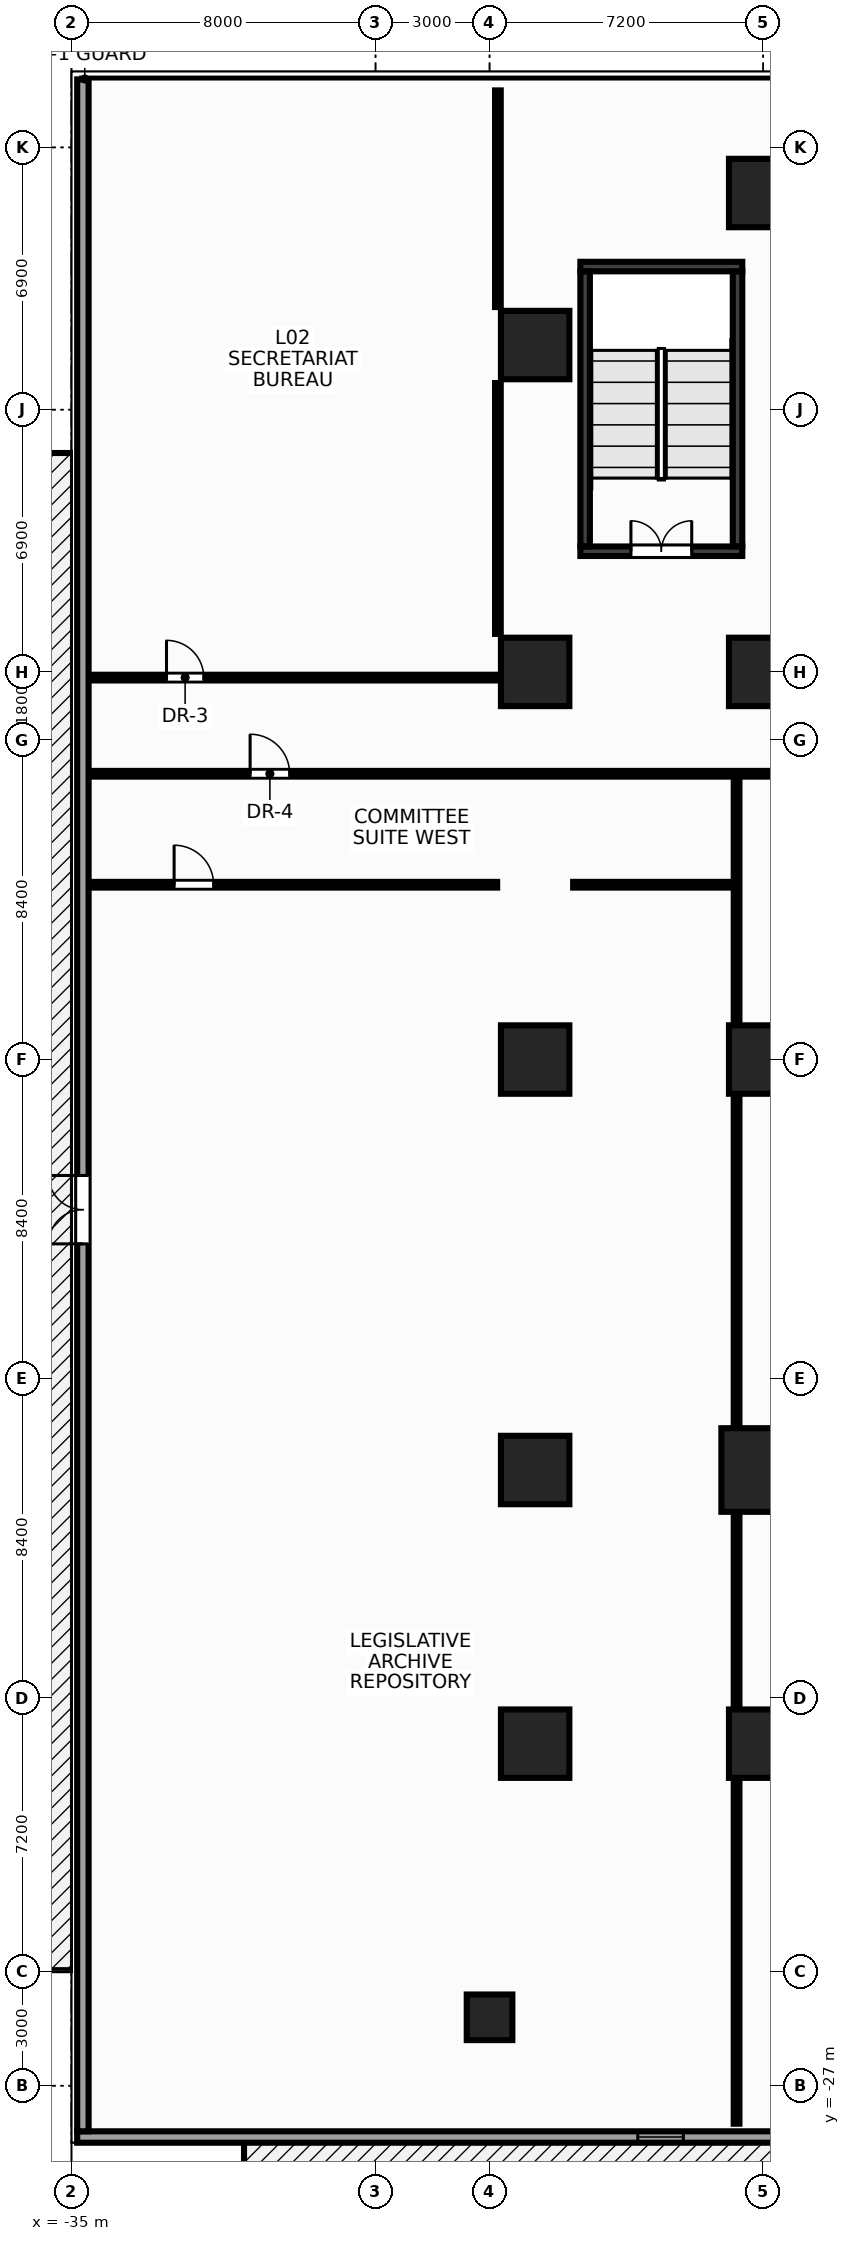
"""IFC4 building model, lengths in metres.
Left out: names, types, materials, properties, quantities, classifications, styles, units other than length and angle.
Written with IfcOpenShell. Run it as: python <this file> out.ifc"""

import sys

from ifc_helpers import new_model, si_unit, direction, frame, frame_2d, origin, origin_2d, place, context, subcontext, project, spatial, rectangle, hollow_rectangle, extrude, source, transform, mapped, element, fill, save


model = new_model("IFC4")
c1 = context("Model", 3, precision=1e-05, world=origin(), true_north=direction((0.0, 1.0)))
c2 = subcontext(c1, "Body", "Model", "MODEL_VIEW")
j1 = project(units=[si_unit("LENGTHUNIT", "METRE"), si_unit("PLANEANGLEUNIT", "RADIAN")], contexts=[c1])
p1 = place(None, origin())
s1 = spatial("IfcSite", under=j1, at=p1, CompositionType="ELEMENT")
p2 = place(p1, origin())
s2 = spatial("IfcBuilding", under=s1, at=p2, CompositionType="ELEMENT")
p3 = place(p2, frame((0.0, 0.0, 9.65)))
s3 = spatial("IfcBuildingStorey", under=s2, at=p3, CompositionType="ELEMENT", Elevation=9.65)
m1 = source(origin(), c2, "Body", "SweptSolid", [
    extrude(rectangle(XDim=4.26, YDim=0.25, at=frame_2d((2.13, 0.0))), origin(), (0.0, 0.0, 1.0), 4.65),
])
p4 = place(p3, frame((-21.61, 20.865, 0.0), z_axis=(0.0, 0.0, 1.0), x_axis=(1.0, 0.0, 0.0)))
e1 = element("IfcWall", 1, at=p4, inside=s3, PredefinedType="SHEAR", context=c2, shape_type="MappedRepresentation", body=[
    mapped(m1, transform((0.0, 0.0, 0.0), x_axis=(1.0, 0.0, 0.0), y_axis=(0.0, 1.0, 0.0), z_axis=(0.0, 0.0, 1.0), scale=1.0)),
])
p5 = place(p3, frame((-21.61, 13.375, 0.0), z_axis=(0.0, 0.0, 1.0), x_axis=(1.0, 0.0, 0.0)))
e2 = element("IfcWall", 2, at=p5, inside=s3, PredefinedType="SHEAR", context=c2, shape_type="MappedRepresentation", body=[
    mapped(m1, transform((0.0, 0.0, 0.0), x_axis=(1.0, 0.0, 0.0), y_axis=(0.0, 1.0, 0.0), z_axis=(0.0, 0.0, 1.0), scale=1.0)),
])
p6 = place(p5, frame((1.33, 0.0, 0.0)))
e3 = element("IfcOpeningElement", 3, at=p6, cuts=e2, PredefinedType="OPENING", context=c2, shape_type="SweptSolid", body=[
    extrude(rectangle(XDim=1.6, YDim=2.15, at=frame_2d((0.8, 1.075))), frame((0.0, 0.137, 0.0), z_axis=(0.0, -1.0, 0.0), x_axis=(1.0, 0.0, 0.0)), (0.0, 0.0, 1.0), 0.274),
])
m2 = source(origin(), c2, "Body", "SweptSolid", [
    extrude(rectangle(XDim=7.23, YDim=0.25, at=frame_2d((3.615, 0.0))), origin(), (0.0, 0.0, 1.0), 4.65),
])
for number, where, z_axis, x_axis in (
    (4, (-21.485, 13.505, 0.0), (0.0, 0.0, 1.0), (0.0, 1.0, 0.0)),
    (5, (-17.475, 13.505, 0.0), (0.0, 0.0, 1.0), (0.0, 1.0, 0.0)),
):
    element("IfcWall", number, at=place(p3, frame(where, z_axis=z_axis, x_axis=x_axis)), inside=s3, PredefinedType="SHEAR", context=c2, shape_type="MappedRepresentation", body=[
        mapped(m2, transform((0.0, 0.0, 0.0), x_axis=(1.0, 0.0, 0.0), y_axis=(0.0, 1.0, 0.0), z_axis=(0.0, 0.0, 1.0), scale=1.0)),
    ])
m3 = source(origin(), c2, "Body", "SweptSolid", [
    extrude(hollow_rectangle(XDim=1.2, YDim=1.2, WallThickness=0.055, at=origin_2d()), origin(), (0.0, 0.0, 1.0), 4.62),
])
p7 = place(p3, frame((-24.0, -25.2, 0.0), z_axis=(0.0, 0.0, 1.0), x_axis=(1.0, 0.0, 0.0)))
e6 = element("IfcColumn", 6, at=p7, inside=s3, PredefinedType="COLUMN", context=c2, shape_type="MappedRepresentation", body=[
    mapped(m3, transform((0.0, 0.0, 0.0), x_axis=(1.0, 0.0, 0.0), y_axis=(0.0, 1.0, 0.0), z_axis=(0.0, 0.0, 1.0), scale=1.0)),
])
m4 = source(origin(), c2, "Body", "SweptSolid", [
    extrude(rectangle(XDim=1.8, YDim=1.8, at=origin_2d()), origin(), (0.0, 0.0, 1.0), 4.65),
])
p8 = place(p3, frame((-16.8, -18.0, 0.0), z_axis=(0.0, 0.0, 1.0), x_axis=(1.0, 0.0, 0.0)))
e7 = element("IfcColumn", 7, at=p8, inside=s3, PredefinedType="COLUMN", context=c2, shape_type="MappedRepresentation", body=[
    mapped(m4, transform((0.0, 0.0, 0.0), x_axis=(1.0, 0.0, 0.0), y_axis=(0.0, 1.0, 0.0), z_axis=(0.0, 0.0, 1.0), scale=1.0)),
])
m5 = source(origin(), c2, "Body", "SweptSolid", [
    extrude(rectangle(XDim=2.2, YDim=2.2, at=origin_2d()), origin(), (0.0, 0.0, 1.0), 4.65),
])
p9 = place(p3, frame((-16.8, -10.8, 0.0), z_axis=(0.0, 0.0, 1.0), x_axis=(1.0, 0.0, 0.0)))
e8 = element("IfcColumn", 8, at=p9, inside=s3, PredefinedType="COLUMN", context=c2, shape_type="MappedRepresentation", body=[
    mapped(m5, transform((0.0, 0.0, 0.0), x_axis=(1.0, 0.0, 0.0), y_axis=(0.0, 1.0, 0.0), z_axis=(0.0, 0.0, 1.0), scale=1.0)),
])
for number, where, z_axis, x_axis in (
    (9, (-16.8, 0.0, 0.0), (0.0, 0.0, 1.0), (1.0, 0.0, 0.0)),
    (10, (-16.8, 10.2, 0.0), (0.0, 0.0, 1.0), (1.0, 0.0, 0.0)),
    (11, (-16.8, 22.8, 0.0), (0.0, 0.0, 1.0), (1.0, 0.0, 0.0)),
    (12, (-22.8, -18.0, 0.0), (0.0, 0.0, 1.0), (1.0, 0.0, 0.0)),
    (13, (-22.8, -10.8, 0.0), (0.0, 0.0, 1.0), (1.0, 0.0, 0.0)),
    (14, (-22.8, 0.0, 0.0), (0.0, 0.0, 1.0), (1.0, 0.0, 0.0)),
    (15, (-22.8, 10.2, 0.0), (0.0, 0.0, 1.0), (1.0, 0.0, 0.0)),
    (16, (-22.8, 18.8, 0.0), (0.0, 0.0, 1.0), (1.0, 0.0, 0.0)),
):
    element("IfcColumn", number, at=place(p3, frame(where, z_axis=z_axis, x_axis=x_axis)), inside=s3, PredefinedType="COLUMN", context=c2, shape_type="MappedRepresentation", body=[
        mapped(m4, transform((0.0, 0.0, 0.0), x_axis=(1.0, 0.0, 0.0), y_axis=(0.0, 1.0, 0.0), z_axis=(0.0, 0.0, 1.0), scale=1.0)),
    ])
m6 = source(origin(), c2, "Body", "SweptSolid", [
    extrude(rectangle(XDim=69.7, YDim=0.3, at=frame_2d((34.85, 0.0))), origin(), (0.0, 0.0, 1.0), 3.87),
])
p10 = place(p3, frame((34.85, -28.35, 0.0), z_axis=(0.0, 0.0, 1.0), x_axis=(-1.0, 0.0, 0.0)))
e17 = element("IfcWall", 17, at=p10, inside=s3, PredefinedType="STANDARD", context=c2, shape_type="MappedRepresentation", body=[
    mapped(m6, transform((0.0, 0.0, 0.0), x_axis=(1.0, 0.0, 0.0), y_axis=(0.0, 1.0, 0.0), z_axis=(0.0, 0.0, 1.0), scale=1.0)),
])
p11 = place(p10, frame((14.75, 0.0, 0.9)))
e18 = element("IfcOpeningElement", 18, at=p11, cuts=e17, PredefinedType="OPENING", context=c2, shape_type="SweptSolid", body=[
    extrude(rectangle(XDim=1.2, YDim=2.0, at=frame_2d((0.6, 1.0))), frame((0.0, 0.162, 0.0), z_axis=(0.0, -1.0, 0.0), x_axis=(1.0, 0.0, 0.0)), (0.0, 0.0, 1.0), 0.324),
])
p12 = place(p10, frame((21.25, 0.0, 0.9)))
e19 = element("IfcOpeningElement", 19, at=p12, cuts=e17, PredefinedType="OPENING", context=c2, shape_type="SweptSolid", body=[
    extrude(rectangle(XDim=1.2, YDim=2.0, at=frame_2d((0.6, 1.0))), frame((0.0, 0.162, 0.0), z_axis=(0.0, -1.0, 0.0), x_axis=(1.0, 0.0, 0.0)), (0.0, 0.0, 1.0), 0.324),
])
p13 = place(p10, frame((47.25, 0.0, 0.9)))
e20 = element("IfcOpeningElement", 20, at=p13, cuts=e17, PredefinedType="OPENING", context=c2, shape_type="SweptSolid", body=[
    extrude(rectangle(XDim=1.2, YDim=2.0, at=frame_2d((0.6, 1.0))), frame((0.0, 0.162, 0.0), z_axis=(0.0, -1.0, 0.0), x_axis=(1.0, 0.0, 0.0)), (0.0, 0.0, 1.0), 0.324),
])
p14 = place(p10, frame((53.75, 0.0, 0.9)))
e21 = element("IfcOpeningElement", 21, at=p14, cuts=e17, PredefinedType="OPENING", context=c2, shape_type="SweptSolid", body=[
    extrude(rectangle(XDim=1.2, YDim=2.0, at=frame_2d((0.6, 1.0))), frame((0.0, 0.162, 0.0), z_axis=(0.0, -1.0, 0.0), x_axis=(1.0, 0.0, 0.0)), (0.0, 0.0, 1.0), 0.324),
])
p15 = place(p10, frame((30.35, 0.0, 0.0)))
e22 = element("IfcOpeningElement", 22, at=p15, cuts=e17, PredefinedType="OPENING", context=c2, shape_type="SweptSolid", body=[
    extrude(rectangle(XDim=1.8, YDim=2.2, at=frame_2d((0.9, 1.1))), frame((0.0, 0.162, 0.0), z_axis=(0.0, -1.0, 0.0), x_axis=(1.0, 0.0, 0.0)), (0.0, 0.0, 1.0), 0.324),
])
p16 = place(p10, frame((38.35, 0.0, 0.0)))
e23 = element("IfcOpeningElement", 23, at=p16, cuts=e17, PredefinedType="OPENING", context=c2, shape_type="SweptSolid", body=[
    extrude(rectangle(XDim=1.8, YDim=2.2, at=frame_2d((0.9, 1.1))), frame((0.0, 0.162, 0.0), z_axis=(0.0, -1.0, 0.0), x_axis=(1.0, 0.0, 0.0)), (0.0, 0.0, 1.0), 0.324),
])
m7 = source(origin(), c2, "Body", "SweptSolid", [
    extrude(rectangle(XDim=53.99, YDim=0.3, at=frame_2d((26.995, 0.0))), origin(), (0.0, 0.0, 1.0), 3.87),
])
p17 = place(p3, frame((-34.7, -28.2, 0.0), z_axis=(0.0, 0.0, 1.0), x_axis=(0.0, 1.0, 0.0)))
e24 = element("IfcWall", 24, at=p17, inside=s3, PredefinedType="STANDARD", context=c2, shape_type="MappedRepresentation", body=[
    mapped(m7, transform((0.0, 0.0, 0.0), x_axis=(1.0, 0.0, 0.0), y_axis=(0.0, 1.0, 0.0), z_axis=(0.0, 0.0, 1.0), scale=1.0)),
])
p18 = place(p17, frame((23.35, 0.0, 0.0)))
e25 = element("IfcOpeningElement", 25, at=p18, cuts=e24, PredefinedType="OPENING", context=c2, shape_type="SweptSolid", body=[
    extrude(rectangle(XDim=1.8, YDim=2.2, at=frame_2d((0.9, 1.1))), frame((0.0, 0.162, 0.0), z_axis=(0.0, -1.0, 0.0), x_axis=(1.0, 0.0, 0.0)), (0.0, 0.0, 1.0), 0.324),
])
m8 = source(origin(), c2, "Body", "SweptSolid", [
    extrude(rectangle(XDim=69.0, YDim=0.15, at=frame_2d((34.5, 0.0))), origin(), (0.0, 0.0, 1.0), 3.755),
])
p19 = place(p3, frame((-34.5, 7.52, 0.0), z_axis=(0.0, 0.0, 1.0), x_axis=(1.0, 0.0, 0.0)))
e26 = element("IfcWall", 26, at=p19, inside=s3, PredefinedType="PARTITIONING", context=c2, shape_type="MappedRepresentation", body=[
    mapped(m8, transform((0.0, 0.0, 0.0), x_axis=(1.0, 0.0, 0.0), y_axis=(0.0, 1.0, 0.0), z_axis=(0.0, 0.0, 1.0), scale=1.0)),
])
p20 = place(p19, frame((4.2, 0.0, 0.0)))
e27 = element("IfcOpeningElement", 27, at=p20, cuts=e26, PredefinedType="OPENING", context=c2, shape_type="SweptSolid", body=[
    extrude(rectangle(XDim=1.04, YDim=2.2, at=frame_2d((0.52, 1.1))), frame((0.0, 0.087, 0.0), z_axis=(0.0, -1.0, 0.0), x_axis=(1.0, 0.0, 0.0)), (0.0, 0.0, 1.0), 0.174),
])
p21 = place(p19, frame((33.7, 0.0, 0.0)))
e28 = element("IfcOpeningElement", 28, at=p21, cuts=e26, PredefinedType="OPENING", context=c2, shape_type="SweptSolid", body=[
    extrude(rectangle(XDim=1.65, YDim=2.35, at=frame_2d((0.825, 1.175))), frame((0.0, 0.087, 0.0), z_axis=(0.0, -1.0, 0.0), x_axis=(1.0, 0.0, 0.0)), (0.0, 0.0, 1.0), 0.174),
])
p22 = place(p19, frame((63.7, 0.0, 0.0)))
e29 = element("IfcOpeningElement", 29, at=p22, cuts=e26, PredefinedType="OPENING", context=c2, shape_type="SweptSolid", body=[
    extrude(rectangle(XDim=1.04, YDim=2.2, at=frame_2d((0.52, 1.1))), frame((0.0, 0.087, 0.0), z_axis=(0.0, -1.0, 0.0), x_axis=(1.0, 0.0, 0.0)), (0.0, 0.0, 1.0), 0.174),
])
m9 = source(origin(), c2, "Body", "SweptSolid", [
    extrude(rectangle(XDim=10.7, YDim=0.15, at=frame_2d((5.35, 0.0))), origin(), (0.0, 0.0, 1.0), 4.37),
])
p23 = place(p3, frame((-34.5, 10.05, 0.0), z_axis=(0.0, 0.0, 1.0), x_axis=(1.0, 0.0, 0.0)))
e30 = element("IfcWall", 30, at=p23, inside=s3, PredefinedType="PARTITIONING", context=c2, shape_type="MappedRepresentation", body=[
    mapped(m9, transform((0.0, 0.0, 0.0), x_axis=(1.0, 0.0, 0.0), y_axis=(0.0, 1.0, 0.0), z_axis=(0.0, 0.0, 1.0), scale=1.0)),
])
p24 = place(p23, frame((2.0, 0.0, 0.0)))
e31 = element("IfcOpeningElement", 31, at=p24, cuts=e30, PredefinedType="OPENING", context=c2, shape_type="SweptSolid", body=[
    extrude(rectangle(XDim=0.98, YDim=2.15, at=frame_2d((0.49, 1.075))), frame((0.0, 0.087, 0.0), z_axis=(0.0, -1.0, 0.0), x_axis=(1.0, 0.0, 0.0)), (0.0, 0.0, 1.0), 0.174),
])
m10 = source(origin(), c2, "Body", "SweptSolid", [
    extrude(rectangle(XDim=6.6, YDim=0.15, at=frame_2d((3.3, 0.0))), origin(), (0.0, 0.0, 1.0), 4.37),
])
p25 = place(p3, frame((-23.78, 11.2, 0.0), z_axis=(0.0, 0.0, 1.0), x_axis=(0.0, 1.0, 0.0)))
e32 = element("IfcWall", 32, at=p25, inside=s3, PredefinedType="PARTITIONING", context=c2, shape_type="MappedRepresentation", body=[
    mapped(m10, transform((0.0, 0.0, 0.0), x_axis=(1.0, 0.0, 0.0), y_axis=(0.0, 1.0, 0.0), z_axis=(0.0, 0.0, 1.0), scale=1.0)),
])
m11 = source(origin(), c2, "Body", "SweptSolid", [
    extrude(rectangle(XDim=5.7, YDim=0.15, at=frame_2d((2.85, 0.0))), origin(), (0.0, 0.0, 1.0), 4.37),
])
p26 = place(p3, frame((-23.78, 19.8, 0.0), z_axis=(0.0, 0.0, 1.0), x_axis=(0.0, 1.0, 0.0)))
e33 = element("IfcWall", 33, at=p26, inside=s3, PredefinedType="PARTITIONING", context=c2, shape_type="MappedRepresentation", body=[
    mapped(m11, transform((0.0, 0.0, 0.0), x_axis=(1.0, 0.0, 0.0), y_axis=(0.0, 1.0, 0.0), z_axis=(0.0, 0.0, 1.0), scale=1.0)),
])
m12 = source(origin(), c2, "Body", "SweptSolid", [
    extrude(rectangle(XDim=35.38, YDim=0.15, at=frame_2d((17.69, 0.0))), origin(), (0.0, 0.0, 1.0), 3.655),
])
p27 = place(p3, frame((-17.5, -28.0, 0.0), z_axis=(0.0, 0.0, 1.0), x_axis=(0.0, 1.0, 0.0)))
e34 = element("IfcWall", 34, at=p27, inside=s3, PredefinedType="PARTITIONING", context=c2, shape_type="MappedRepresentation", body=[
    mapped(m12, transform((0.0, 0.0, 0.0), x_axis=(1.0, 0.0, 0.0), y_axis=(0.0, 1.0, 0.0), z_axis=(0.0, 0.0, 1.0), scale=1.0)),
])
p28 = place(p3, frame((-34.5, 4.6, 0.0), z_axis=(0.0, 0.0, 1.0), x_axis=(1.0, 0.0, 0.0)))
e35 = element("IfcWall", 35, at=p28, inside=s3, PredefinedType="PARTITIONING", context=c2, shape_type="MappedRepresentation", body=[
    mapped(m9, transform((0.0, 0.0, 0.0), x_axis=(1.0, 0.0, 0.0), y_axis=(0.0, 1.0, 0.0), z_axis=(0.0, 0.0, 1.0), scale=1.0)),
])
p29 = place(p28, frame((2.2, 0.0, 0.0)))
e36 = element("IfcOpeningElement", 36, at=p29, cuts=e35, PredefinedType="OPENING", context=c2, shape_type="SweptSolid", body=[
    extrude(rectangle(XDim=1.04, YDim=2.2, at=frame_2d((0.52, 1.1))), frame((0.0, 0.087, 0.0), z_axis=(0.0, -1.0, 0.0), x_axis=(1.0, 0.0, 0.0)), (0.0, 0.0, 1.0), 0.174),
])
m13 = source(origin(), c2, "Body", "SweptSolid", [
    extrude(rectangle(XDim=4.18, YDim=0.15, at=frame_2d((2.09, 0.0))), origin(), (0.0, 0.0, 1.0), 4.37),
])
p30 = place(p3, frame((-21.8, 4.6, 0.0), z_axis=(0.0, 0.0, 1.0), x_axis=(1.0, 0.0, 0.0)))
e37 = element("IfcWall", 37, at=p30, inside=s3, PredefinedType="PARTITIONING", context=c2, shape_type="MappedRepresentation", body=[
    mapped(m13, transform((0.0, 0.0, 0.0), x_axis=(1.0, 0.0, 0.0), y_axis=(0.0, 1.0, 0.0), z_axis=(0.0, 0.0, 1.0), scale=1.0)),
])
m14 = source(origin(), c2, "Body", "SweptSolid", [
    extrude(rectangle(XDim=1.2, YDim=2.0, at=frame_2d((0.6, 1.0))), frame((0.0, 0.03, 0.0), z_axis=(0.0, -1.0, 0.0), x_axis=(1.0, 0.0, 0.0)), (0.0, 0.0, 1.0), 0.06),
])
p31 = place(p14, origin())
e38 = element("IfcWindow", 38, at=p31, inside=s3, PartitioningType="SINGLE_PANEL", PredefinedType="WINDOW", context=c2, shape_type="MappedRepresentation", body=[
    mapped(m14, transform((0.0, 0.0, 0.0), x_axis=(1.0, 0.0, 0.0), y_axis=(0.0, 1.0, 0.0), z_axis=(0.0, 0.0, 1.0), scale=1.0)),
])
fill(e21, e38)
m15 = source(origin(), c2, "Body", "SweptSolid", [
    extrude(rectangle(XDim=1.8, YDim=2.2, at=frame_2d((0.9, 1.1))), frame((0.0, 0.025, 0.0), z_axis=(0.0, -1.0, 0.0), x_axis=(1.0, 0.0, 0.0)), (0.0, 0.0, 1.0), 0.05),
])
p32 = place(p18, origin())
e39 = element("IfcDoor", 39, at=p32, inside=s3, OperationType="DOUBLE_DOOR_SINGLE_SWING", PredefinedType="DOOR", context=c2, shape_type="MappedRepresentation", body=[
    mapped(m15, transform((0.0, 0.0, 0.0), x_axis=(1.0, 0.0, 0.0), y_axis=(0.0, 1.0, 0.0), z_axis=(0.0, 0.0, 1.0), scale=1.0)),
])
fill(e25, e39)
m16 = source(origin(), c2, "Body", "SweptSolid", [
    extrude(rectangle(XDim=1.6, YDim=2.15, at=frame_2d((0.8, 1.075))), frame((0.0, 0.025, 0.0), z_axis=(0.0, -1.0, 0.0), x_axis=(1.0, 0.0, 0.0)), (0.0, 0.0, 1.0), 0.05),
])
p33 = place(p6, origin())
e40 = element("IfcDoor", 40, at=p33, inside=s3, OperationType="DOUBLE_DOOR_SINGLE_SWING", PredefinedType="DOOR", context=c2, shape_type="MappedRepresentation", body=[
    mapped(m16, transform((0.0, 0.0, 0.0), x_axis=(1.0, 0.0, 0.0), y_axis=(0.0, 1.0, 0.0), z_axis=(0.0, 0.0, 1.0), scale=1.0)),
])
fill(e3, e40)
m17 = source(origin(), c2, "Body", "SweptSolid", [
    extrude(rectangle(XDim=1.04, YDim=2.2, at=frame_2d((0.52, 1.1))), frame((0.0, 0.025, 0.0), z_axis=(0.0, -1.0, 0.0), x_axis=(1.0, 0.0, 0.0)), (0.0, 0.0, 1.0), 0.05),
])
p34 = place(p20, origin())
e41 = element("IfcDoor", 41, at=p34, inside=s3, OperationType="SINGLE_SWING_LEFT", PredefinedType="DOOR", context=c2, shape_type="MappedRepresentation", body=[
    mapped(m17, transform((0.0, 0.0, 0.0), x_axis=(1.0, 0.0, 0.0), y_axis=(0.0, 1.0, 0.0), z_axis=(0.0, 0.0, 1.0), scale=1.0)),
])
fill(e27, e41)
p35 = place(p29, origin())
e42 = element("IfcDoor", 42, at=p35, inside=s3, OperationType="SINGLE_SWING_LEFT", PredefinedType="DOOR", context=c2, shape_type="MappedRepresentation", body=[
    mapped(m17, transform((0.0, 0.0, 0.0), x_axis=(1.0, 0.0, 0.0), y_axis=(0.0, 1.0, 0.0), z_axis=(0.0, 0.0, 1.0), scale=1.0)),
])
fill(e36, e42)
m18 = source(origin(), c2, "Body", "SweptSolid", [
    extrude(rectangle(XDim=0.98, YDim=2.15, at=frame_2d((0.49, 1.075))), frame((0.0, 0.025, 0.0), z_axis=(0.0, -1.0, 0.0), x_axis=(1.0, 0.0, 0.0)), (0.0, 0.0, 1.0), 0.05),
])
p36 = place(p24, origin())
e43 = element("IfcDoor", 43, at=p36, inside=s3, OperationType="SINGLE_SWING_LEFT", PredefinedType="DOOR", context=c2, shape_type="MappedRepresentation", body=[
    mapped(m18, transform((0.0, 0.0, 0.0), x_axis=(1.0, 0.0, 0.0), y_axis=(0.0, 1.0, 0.0), z_axis=(0.0, 0.0, 1.0), scale=1.0)),
])
fill(e31, e43)
save(model, sys.argv[1])
